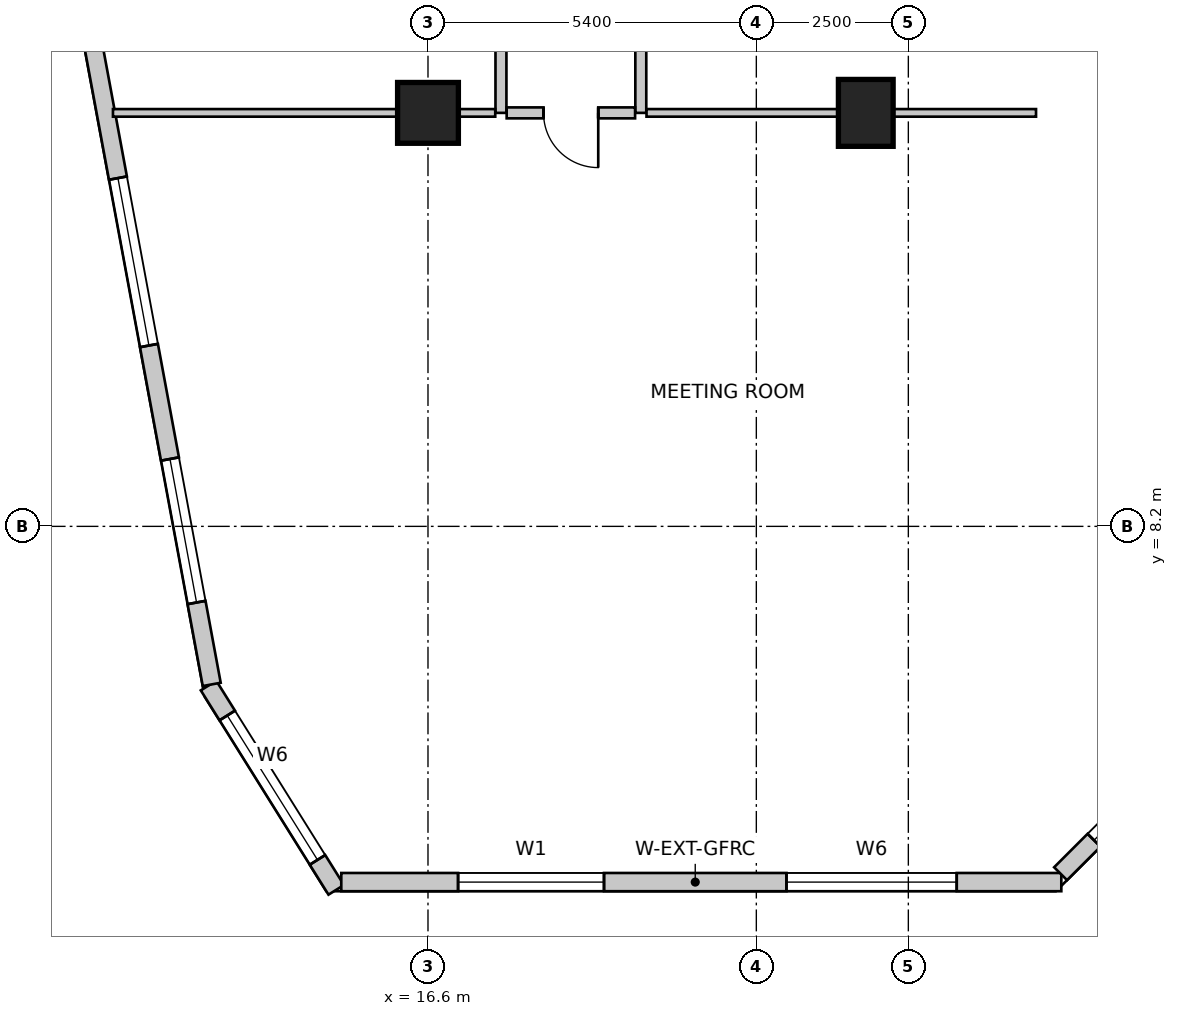
"""IFC4 building model, lengths in metres.
Left out: names, types, materials, properties, quantities, classifications, styles, units other than length and angle.
Written with IfcOpenShell. Run it as: python <this file> out.ifc"""

import sys

from ifc_helpers import new_model, si_unit, direction, frame, frame_2d, origin, origin_2d, place, context, subcontext, project, spatial, rectangle, extrude, source, transform, mapped, element, fill, save


model = new_model("IFC4")
c1 = context("Model", 3, precision=1e-05, world=origin(), true_north=direction((0.0, 1.0)))
c2 = subcontext(c1, "Body", "Model", "MODEL_VIEW")
j1 = project(units=[si_unit("LENGTHUNIT", "METRE"), si_unit("PLANEANGLEUNIT", "RADIAN")], contexts=[c1])
p1 = place(None, origin())
s1 = spatial("IfcSite", under=j1, at=p1, CompositionType="ELEMENT")
p2 = place(p1, origin())
s2 = spatial("IfcBuilding", under=s1, at=p2, CompositionType="ELEMENT")
p3 = place(p2, frame((0.0, 0.0, 39.0)))
s3 = spatial("IfcBuildingStorey", under=s2, at=p3, CompositionType="ELEMENT", Elevation=39.0)
m1 = source(origin(), c2, "Body", "SweptSolid", [
    extrude(rectangle(XDim=0.9, YDim=1.1, at=origin_2d()), origin(), (0.0, 0.0, 1.0), 4.0),
])
p4 = place(p3, frame((23.8, 15.0, 0.0), z_axis=(0.0, 0.0, 1.0), x_axis=(1.0, 0.0, 0.0)))
e1 = element("IfcColumn", 1, at=p4, inside=s3, PredefinedType="COLUMN", context=c2, shape_type="MappedRepresentation", body=[
    mapped(m1, transform((0.0, 0.0, 0.0), scale=1.0)),
])
m2 = source(origin(), c2, "Body", "SweptSolid", [
    extrude(rectangle(XDim=1.0, YDim=1.0, at=origin_2d()), origin(), (0.0, 0.0, 1.0), 4.0),
])
p5 = place(p3, frame((16.6, 15.0, 0.0), z_axis=(0.0, 0.0, 1.0), x_axis=(1.0, 0.0, 0.0)))
e2 = element("IfcColumn", 2, at=p5, inside=s3, PredefinedType="COLUMN", context=c2, shape_type="MappedRepresentation", body=[
    mapped(m2, transform((0.0, 0.0, 0.0), scale=1.0)),
])
p6 = place(p3, frame((12.991, 5.583, 0.0), z_axis=(0.0, 0.0, 1.0), x_axis=(0.530015557218, -0.847987918019, 0.0)))
e3 = element("IfcWall", 3, at=p6, inside=s3, PredefinedType="SOLIDWALL", context=c2, shape_type="SweptSolid", body=[
    extrude(rectangle(XDim=3.962, YDim=0.3, at=frame_2d((1.981, 0.0))), origin(), (0.0, 0.0, 1.0), 3.75),
])
m3 = source(origin(), c2, "Body", "SweptSolid", [
    extrude(rectangle(XDim=2.8, YDim=2.4, at=frame_2d((1.4, 1.2))), frame((0.0, 0.16, 0.0), z_axis=(0.0, -1.0, 0.0), x_axis=(1.0, 0.0, 0.0)), (0.0, 0.0, 1.0), 0.32),
])
p7 = place(p6, frame((0.581, 0.0, 0.85)))
e4 = element("IfcOpeningElement", 4, at=p7, cuts=e3, PredefinedType="OPENING", context=c2, shape_type="MappedRepresentation", body=[
    mapped(m3, transform((0.0, 0.0, 0.0), scale=1.0)),
])
p8 = place(p3, frame((15.174, 2.35, 0.0), z_axis=(0.0, 0.0, 1.0), x_axis=(1.0, 0.0, 0.0)))
e5 = element("IfcWall", 5, at=p8, inside=s3, PredefinedType="SOLIDWALL", context=c2, shape_type="SweptSolid", body=[
    extrude(rectangle(XDim=11.842, YDim=0.3, at=frame_2d((5.921, 0.0))), origin(), (0.0, 0.0, 1.0), 3.75),
])
m4 = source(origin(), c2, "Body", "SweptSolid", [
    extrude(rectangle(XDim=2.4, YDim=2.2, at=frame_2d((1.2, 1.1))), frame((0.0, 0.16, 0.0), z_axis=(0.0, -1.0, 0.0), x_axis=(1.0, 0.0, 0.0)), (0.0, 0.0, 1.0), 0.32),
])
p9 = place(p8, frame((1.921, 0.0, 0.85)))
e6 = element("IfcOpeningElement", 6, at=p9, cuts=e5, PredefinedType="OPENING", context=c2, shape_type="MappedRepresentation", body=[
    mapped(m4, transform((0.0, 0.0, 0.0), scale=1.0)),
])
p10 = place(p8, frame((7.322, 0.0, 0.85)))
e7 = element("IfcOpeningElement", 7, at=p10, cuts=e5, PredefinedType="OPENING", context=c2, shape_type="MappedRepresentation", body=[
    mapped(m3, transform((0.0, 0.0, 0.0), scale=1.0)),
])
p11 = place(p3, frame((27.004, 2.488, 0.0), z_axis=(0.0, 0.0, 1.0), x_axis=(0.707106781187, 0.707106781187, 0.0)))
e8 = element("IfcWall", 8, at=p11, inside=s3, PredefinedType="SOLIDWALL", context=c2, shape_type="SweptSolid", body=[
    extrude(rectangle(XDim=4.356, YDim=0.3, at=frame_2d((2.178, 0.0))), origin(), (0.0, 0.0, 1.0), 3.75),
])
p12 = place(p11, frame((0.778, 0.0, 0.85)))
e9 = element("IfcOpeningElement", 9, at=p12, cuts=e8, PredefinedType="OPENING", context=c2, shape_type="MappedRepresentation", body=[
    mapped(m3, transform((0.0, 0.0, 0.0), scale=1.0)),
])
p13 = place(p3, frame((8.183, 31.833, 0.0), z_axis=(0.0, 0.0, 1.0), x_axis=(0.18216364648, -0.983268226834, 0.0)))
e10 = element("IfcWall", 10, at=p13, inside=s3, PredefinedType="SOLIDWALL", context=c2, shape_type="SweptSolid", body=[
    extrude(rectangle(XDim=26.678, YDim=0.3, at=frame_2d((13.339, 0.0))), origin(), (0.0, 0.0, 1.0), 3.75),
])
p14 = place(p13, frame((2.952, 0.0, 0.85)))
e11 = element("IfcOpeningElement", 11, at=p14, cuts=e10, PredefinedType="OPENING", context=c2, shape_type="MappedRepresentation", body=[
    mapped(m3, transform((0.0, 0.0, 0.0), scale=1.0)),
])
p15 = place(p13, frame((8.986, 0.0, 0.85)))
e12 = element("IfcOpeningElement", 12, at=p15, cuts=e10, PredefinedType="OPENING", context=c2, shape_type="MappedRepresentation", body=[
    mapped(m3, transform((0.0, 0.0, 0.0), scale=1.0)),
])
p16 = place(p13, frame((13.543, 0.0, 0.85)))
e13 = element("IfcOpeningElement", 13, at=p16, cuts=e10, PredefinedType="OPENING", context=c2, shape_type="MappedRepresentation", body=[
    mapped(m4, transform((0.0, 0.0, 0.0), scale=1.0)),
])
p17 = place(p13, frame((18.211, 0.0, 0.85)))
e14 = element("IfcOpeningElement", 14, at=p17, cuts=e10, PredefinedType="OPENING", context=c2, shape_type="MappedRepresentation", body=[
    mapped(m3, transform((0.0, 0.0, 0.0), scale=1.0)),
])
p18 = place(p13, frame((22.909, 0.0, 0.85)))
e15 = element("IfcOpeningElement", 15, at=p18, cuts=e10, PredefinedType="OPENING", context=c2, shape_type="MappedRepresentation", body=[
    mapped(m4, transform((0.0, 0.0, 0.0), scale=1.0)),
])
p19 = place(p3, frame((17.8, 15.0, 0.0), z_axis=(0.0, 0.0, 1.0), x_axis=(0.0, 1.0, 0.0)))
e16 = element("IfcWall", 16, at=p19, inside=s3, PredefinedType="PARTITIONING", context=c2, shape_type="SweptSolid", body=[
    extrude(rectangle(XDim=8.838, YDim=0.18, at=frame_2d((4.419, 0.0))), origin(), (0.0, 0.0, 1.0), 2.892),
])
m5 = source(origin(), c2, "Body", "SweptSolid", [
    extrude(rectangle(XDim=0.9, YDim=2.15, at=frame_2d((0.45, 1.075))), frame((0.0, 0.1, 0.0), z_axis=(0.0, -1.0, 0.0), x_axis=(1.0, 0.0, 0.0)), (0.0, 0.0, 1.0), 0.2),
])
p20 = place(p19, frame((3.908, 0.0, 0.0)))
e17 = element("IfcOpeningElement", 17, at=p20, cuts=e16, PredefinedType="OPENING", context=c2, shape_type="MappedRepresentation", body=[
    mapped(m5, transform((0.0, 0.0, 0.0), scale=1.0)),
])
p21 = place(p3, frame((20.1, 31.056, 0.0), z_axis=(0.0, 0.0, 1.0), x_axis=(0.0, -1.0, 0.0)))
e18 = element("IfcWall", 18, at=p21, inside=s3, PredefinedType="PARTITIONING", context=c2, shape_type="SweptSolid", body=[
    extrude(rectangle(XDim=16.056, YDim=0.18, at=frame_2d((8.028, 0.0))), origin(), (0.0, 0.0, 1.0), 2.892),
])
p22 = place(p21, frame((7.518, 0.0, 0.0)))
e19 = element("IfcOpeningElement", 19, at=p22, cuts=e18, PredefinedType="OPENING", context=c2, shape_type="MappedRepresentation", body=[
    mapped(m5, transform((0.0, 0.0, 0.0), scale=1.0)),
])
p23 = place(p3, frame((20.006, 15.0, 0.0), z_axis=(0.0, 0.0, 1.0), x_axis=(-1.0, 0.0, 0.0)))
e20 = element("IfcWall", 20, at=p23, inside=s3, PredefinedType="PARTITIONING", context=c2, shape_type="SweptSolid", body=[
    extrude(rectangle(XDim=2.112, YDim=0.18, at=frame_2d((1.056, 0.0))), origin(), (0.0, 0.0, 1.0), 2.892),
])
p24 = place(p23, frame((0.606, 0.0, 0.0)))
e21 = element("IfcOpeningElement", 21, at=p24, cuts=e20, PredefinedType="OPENING", context=c2, shape_type="MappedRepresentation", body=[
    mapped(m5, transform((0.0, 0.0, 0.0), scale=1.0)),
])
p25 = place(p3, frame((17.706, 15.0, 0.0), z_axis=(0.0, 0.0, 1.0), x_axis=(-1.0, 0.0, 0.0)))
e22 = element("IfcWall", 22, at=p25, inside=s3, PredefinedType="PARTITIONING", context=c2, shape_type="SweptSolid", body=[
    extrude(rectangle(XDim=6.287, YDim=0.125, at=frame_2d((3.144, 0.0))), origin(), (0.0, 0.0, 1.0), 2.892),
])
p26 = place(p3, frame((26.6, 15.0, 0.0), z_axis=(0.0, 0.0, 1.0), x_axis=(-1.0, 0.0, 0.0)))
e23 = element("IfcWall", 23, at=p26, inside=s3, PredefinedType="PARTITIONING", context=c2, shape_type="SweptSolid", body=[
    extrude(rectangle(XDim=6.406, YDim=0.125, at=frame_2d((3.203, 0.0))), origin(), (0.0, 0.0, 1.0), 2.892),
])
m6 = source(origin(), c2, "Body", "SweptSolid", [
    extrude(rectangle(XDim=2.8, YDim=2.4, at=frame_2d((1.4, 1.2))), frame((0.0, -0.015, 0.0), z_axis=(0.0, -1.0, 0.0), x_axis=(1.0, 0.0, 0.0)), (0.0, 0.0, 1.0), 0.06),
])
p27 = place(p7, origin())
e24 = element("IfcWindow", 24, at=p27, inside=s3, PartitioningType="SINGLE_PANEL", PredefinedType="WINDOW", context=c2, shape_type="MappedRepresentation", body=[
    mapped(m6, transform((0.0, 0.0, 0.0), scale=1.0)),
])
fill(e4, e24)
m7 = source(origin(), c2, "Body", "SweptSolid", [
    extrude(rectangle(XDim=2.4, YDim=2.2, at=frame_2d((1.2, 1.1))), frame((0.0, -0.015, 0.0), z_axis=(0.0, -1.0, 0.0), x_axis=(1.0, 0.0, 0.0)), (0.0, 0.0, 1.0), 0.06),
])
p28 = place(p9, origin())
e25 = element("IfcWindow", 25, at=p28, inside=s3, PartitioningType="SINGLE_PANEL", PredefinedType="WINDOW", context=c2, shape_type="MappedRepresentation", body=[
    mapped(m7, transform((0.0, 0.0, 0.0), scale=1.0)),
])
fill(e6, e25)
p29 = place(p10, origin())
e26 = element("IfcWindow", 26, at=p29, inside=s3, PartitioningType="SINGLE_PANEL", PredefinedType="WINDOW", context=c2, shape_type="MappedRepresentation", body=[
    mapped(m6, transform((0.0, 0.0, 0.0), scale=1.0)),
])
fill(e7, e26)
p30 = place(p12, origin())
e27 = element("IfcWindow", 27, at=p30, inside=s3, PartitioningType="SINGLE_PANEL", PredefinedType="WINDOW", context=c2, shape_type="MappedRepresentation", body=[
    mapped(m6, transform((0.0, 0.0, 0.0), scale=1.0)),
])
fill(e9, e27)
p31 = place(p17, origin())
e28 = element("IfcWindow", 28, at=p31, inside=s3, PartitioningType="SINGLE_PANEL", PredefinedType="WINDOW", context=c2, shape_type="MappedRepresentation", body=[
    mapped(m6, transform((0.0, 0.0, 0.0), scale=1.0)),
])
fill(e14, e28)
p32 = place(p18, origin())
e29 = element("IfcWindow", 29, at=p32, inside=s3, PartitioningType="SINGLE_PANEL", PredefinedType="WINDOW", context=c2, shape_type="MappedRepresentation", body=[
    mapped(m7, transform((0.0, 0.0, 0.0), scale=1.0)),
])
fill(e15, e29)
m8 = source(origin(), c2, "Body", "SweptSolid", [
    extrude(rectangle(XDim=0.9, YDim=2.15, at=frame_2d((0.45, 1.075))), frame((0.0, 0.025, 0.0), z_axis=(0.0, -1.0, 0.0), x_axis=(1.0, 0.0, 0.0)), (0.0, 0.0, 1.0), 0.05),
])
p33 = place(p24, origin())
e30 = element("IfcDoor", 30, at=p33, inside=s3, OperationType="SINGLE_SWING_LEFT", PredefinedType="DOOR", context=c2, shape_type="MappedRepresentation", body=[
    mapped(m8, transform((0.0, 0.0, 0.0), scale=1.0)),
])
fill(e21, e30)
save(model, sys.argv[1])
